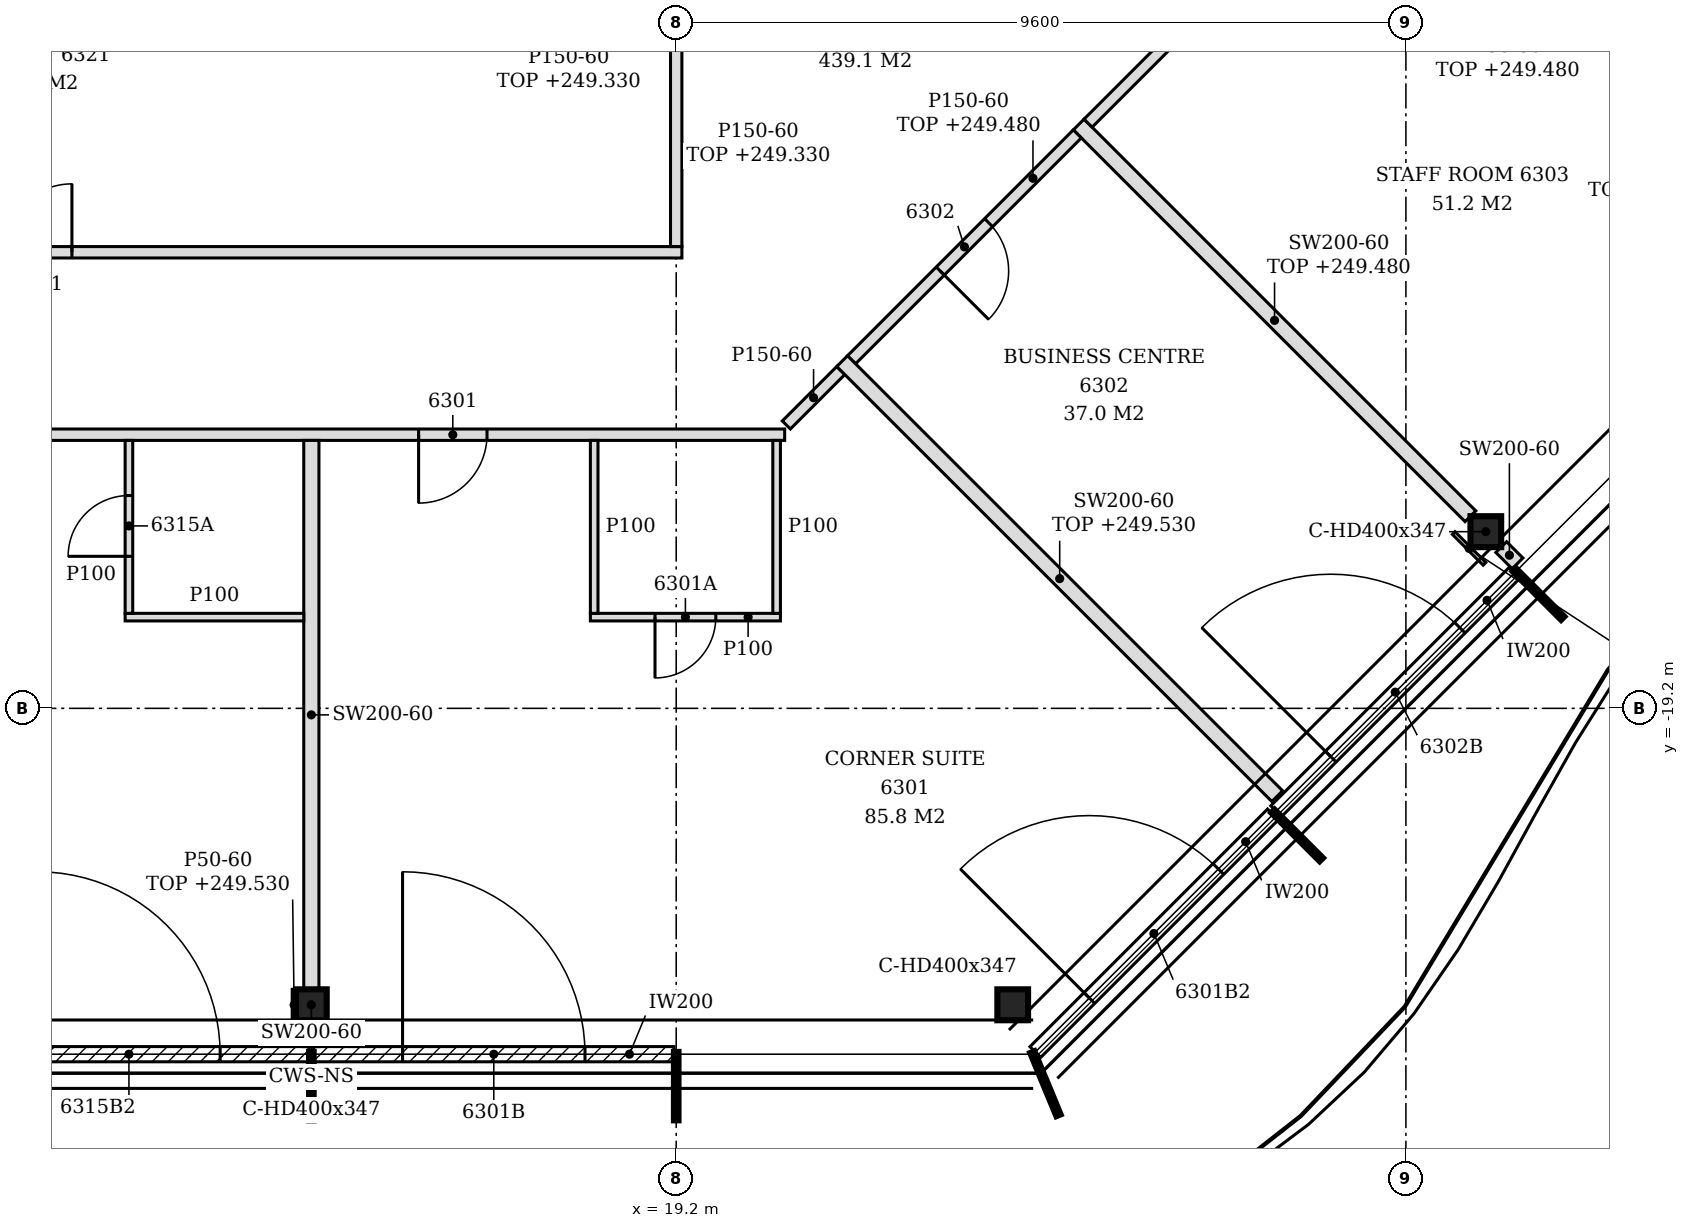
"""IFC4 building model, lengths in metres.
Left out: names, types, materials, properties, quantities, classifications, styles, units other than length and angle.
Written with IfcOpenShell. Run it as: python <this file> out.ifc"""

import sys

from ifc_helpers import new_model, si_unit, direction, frame, frame_2d, origin, origin_2d, place, context, subcontext, project, spatial, polyline, rectangle, i_section, outline, extrude, element, fill, save


model = new_model("IFC4")
c1 = context("Model", 3, precision=1e-05, world=origin(), true_north=direction((0.0, 1.0)))
c2 = subcontext(c1, "Body", "Model", "MODEL_VIEW")
j1 = project(units=[si_unit("LENGTHUNIT", "METRE"), si_unit("PLANEANGLEUNIT", "RADIAN")], contexts=[c1])
p1 = place(None, origin())
s1 = spatial("IfcSite", under=j1, at=p1, CompositionType="ELEMENT")
p2 = place(p1, origin())
s2 = spatial("IfcBuilding", under=s1, at=p2, CompositionType="ELEMENT")
p3 = place(p2, frame((0.0, 0.0, 246.6)))
s3 = spatial("IfcBuildingStorey", under=s2, at=p3, CompositionType="ELEMENT", Elevation=246.6)
for number, where, z_axis, x_axis in (
    (1, (14.4, -23.1, -0.15), (0.0, 0.0, 1.0), (1.0, 0.0, 0.0)),
    (2, (23.627, -23.1, -0.15), (0.0, 0.0, 1.0), (1.0, 0.0, 0.0)),
    (3, (29.852, -16.876, -0.15), (0.0, 0.0, 1.0), (1.0, 0.0, 0.0)),
):
    element("IfcColumn", number, at=place(p3, frame(where, z_axis=z_axis, x_axis=x_axis)), inside=s3, PredefinedType="COLUMN", context=c2, shape_type="SweptSolid", body=[
        extrude(i_section(OverallWidth=0.404, OverallDepth=0.407, WebThickness=0.027, FlangeThickness=0.044, FilletRadius=0.015, at=origin_2d()), origin(), (0.0, 0.0, 1.0), 3.6),
    ])
p4 = place(p3, frame((9.63, -23.75, 0.0), z_axis=(0.0, 0.0, 1.0), x_axis=(1.0, 0.0, 0.0)))
e4 = element("IfcWall", 4, at=p4, inside=s3, PredefinedType="NOTDEFINED", context=c2, shape_type="SweptSolid", body=[
    extrude(rectangle(XDim=4.74, YDim=0.2, at=frame_2d((2.37, 0.0))), origin(), (0.0, 0.0, 1.0), 3.45),
])
p5 = place(p4, frame((1.17, 0.0, 0.0)))
e5 = element("IfcOpeningElement", 5, at=p5, cuts=e4, PredefinedType="OPENING", context=c2, shape_type="SweptSolid", body=[
    extrude(rectangle(XDim=2.4, YDim=2.4, at=frame_2d((1.2, 1.2))), frame((0.0, 0.11, 0.0), z_axis=(0.0, -1.0, 0.0), x_axis=(1.0, 0.0, 0.0)), (0.0, 0.0, 1.0), 0.22),
])
p6 = place(p3, frame((14.43, -23.75, 0.0), z_axis=(0.0, 0.0, 1.0), x_axis=(1.0, 0.0, 0.0)))
e6 = element("IfcWall", 6, at=p6, inside=s3, PredefinedType="NOTDEFINED", context=c2, shape_type="SweptSolid", body=[
    extrude(rectangle(XDim=4.74, YDim=0.2, at=frame_2d((2.37, 0.0))), origin(), (0.0, 0.0, 1.0), 3.45),
])
p7 = place(p6, frame((1.17, 0.0, 0.0)))
e7 = element("IfcOpeningElement", 7, at=p7, cuts=e6, PredefinedType="OPENING", context=c2, shape_type="SweptSolid", body=[
    extrude(rectangle(XDim=2.4, YDim=2.4, at=frame_2d((1.2, 1.2))), frame((0.0, 0.11, 0.0), z_axis=(0.0, -1.0, 0.0), x_axis=(1.0, 0.0, 0.0)), (0.0, 0.0, 1.0), 0.22),
])
p8 = place(p3, frame((23.925, -23.722, 0.0), z_axis=(0.0, 0.0, 1.0), x_axis=(0.707106781187, 0.707106781187, 0.0)))
e8 = element("IfcWall", 8, at=p8, inside=s3, PredefinedType="NOTDEFINED", context=c2, shape_type="SweptSolid", body=[
    extrude(rectangle(XDim=4.421, YDim=0.2, at=frame_2d((2.21, 0.0))), origin(), (0.0, 0.0, 1.0), 3.45),
])
p9 = place(p8, frame((1.005, 0.0, 0.0)))
e9 = element("IfcOpeningElement", 9, at=p9, cuts=e8, PredefinedType="OPENING", context=c2, shape_type="SweptSolid", body=[
    extrude(rectangle(XDim=2.4, YDim=2.4, at=frame_2d((1.2, 1.2))), frame((0.0, 0.11, 0.0), z_axis=(0.0, -1.0, 0.0), x_axis=(1.0, 0.0, 0.0)), (0.0, 0.0, 1.0), 0.22),
])
p10 = place(p3, frame((27.093, -20.553, 0.0), z_axis=(0.0, 0.0, 1.0), x_axis=(0.707079231393, 0.707134329907, 0.0)))
e10 = element("IfcWall", 10, at=p10, inside=s3, PredefinedType="NOTDEFINED", context=c2, shape_type="SweptSolid", body=[
    extrude(rectangle(XDim=4.431, YDim=0.2, at=frame_2d((2.215, 0.0))), origin(), (0.0, 0.0, 1.0), 3.45),
])
p11 = place(p10, frame((1.015, 0.0, 0.0)))
e11 = element("IfcOpeningElement", 11, at=p11, cuts=e10, PredefinedType="OPENING", context=c2, shape_type="SweptSolid", body=[
    extrude(rectangle(XDim=2.4, YDim=2.4, at=frame_2d((1.2, 1.2))), frame((0.0, 0.11, 0.0), z_axis=(0.0, -1.0, 0.0), x_axis=(1.0, 0.0, 0.0)), (0.0, 0.0, 1.0), 0.22),
])
p12 = place(p3, frame((14.4, -23.65, 0.0), z_axis=(0.0, 0.0, 1.0), x_axis=(0.0, 1.0, 0.0)))
e12 = element("IfcWall", 12, at=p12, inside=s3, PredefinedType="PARTITIONING", context=c2, shape_type="SweptSolid", body=[
    extrude(rectangle(XDim=0.346, YDim=0.2, at=frame_2d((0.173, 0.0))), origin(), (0.0, 0.0, 1.0), 3.45),
])
p13 = place(p3, frame((14.4, -22.896, 0.0), z_axis=(0.0, 0.0, 1.0), x_axis=(0.0, 1.0, 0.0)))
e13 = element("IfcWall", 13, at=p13, inside=s3, PredefinedType="PARTITIONING", context=c2, shape_type="SweptSolid", body=[
    extrude(outline(polyline([(0.0, 0.0), (7.221, 0.0), (7.221, 3.45), (3.802, 3.45), (3.8, 2.88), (3.592, 2.88), (3.59, 3.45), (0.0, 3.45), (0.0, 0.0)])), frame((0.0, 0.1, 0.0), z_axis=(0.0, -1.0, 0.0), x_axis=(1.0, 0.0, 0.0)), (0.0, 0.0, 1.0), 0.2),
])
p14 = place(p3, frame((27.107, -20.355, 0.0), z_axis=(0.0, 0.0, 1.0), x_axis=(-0.707182179369, 0.707031374964, 0.0)))
e14 = element("IfcWall", 14, at=p14, inside=s3, PredefinedType="PARTITIONING", context=c2, shape_type="SweptSolid", body=[
    extrude(rectangle(XDim=8.095, YDim=0.2, at=frame_2d((4.047, 0.0))), origin(), (0.0, 0.0, 1.0), 2.93),
])
p15 = place(p3, frame((11.95, -18.0, 0.0), z_axis=(0.0, 0.0, 1.0), x_axis=(1.0, 0.0, 0.0)))
e15 = element("IfcWall", 15, at=p15, inside=s3, PredefinedType="PARTITIONING", context=c2, shape_type="SweptSolid", body=[
    extrude(rectangle(XDim=2.35, YDim=0.1, at=frame_2d((1.175, 0.0))), origin(), (0.0, 0.0, 1.0), 3.45),
])
p16 = place(p3, frame((18.071, -18.0, 0.0), z_axis=(0.0, 0.0, 1.0), x_axis=(1.0, 0.0, 0.0)))
e16 = element("IfcWall", 16, at=p16, inside=s3, PredefinedType="PARTITIONING", context=c2, shape_type="SweptSolid", body=[
    extrude(outline(polyline([(0.0, 0.0), (2.5, 0.0), (2.5, 3.45), (1.279, 3.45), (1.277, 2.73), (0.979, 2.73), (0.977, 3.45), (0.0, 3.45), (0.0, 0.0)])), frame((0.0, 0.05, 0.0), z_axis=(0.0, -1.0, 0.0), x_axis=(1.0, 0.0, 0.0)), (0.0, 0.0, 1.0), 0.1),
])
p17 = place(p16, frame((0.85, 0.0, 0.0)))
e17 = element("IfcOpeningElement", 17, at=p17, cuts=e16, PredefinedType="OPENING", context=c2, shape_type="SweptSolid", body=[
    extrude(rectangle(XDim=0.8, YDim=2.1, at=frame_2d((0.4, 1.05))), frame((0.0, 0.06, 0.0), z_axis=(0.0, -1.0, 0.0), x_axis=(1.0, 0.0, 0.0)), (0.0, 0.0, 1.0), 0.12),
])
p18 = place(p3, frame((12.0, -17.95, 0.0), z_axis=(0.0, 0.0, 1.0), x_axis=(0.0, 1.0, 0.0)))
e18 = element("IfcWall", 18, at=p18, inside=s3, PredefinedType="PARTITIONING", context=c2, shape_type="SweptSolid", body=[
    extrude(rectangle(XDim=2.275, YDim=0.1, at=frame_2d((1.137, 0.0))), origin(), (0.0, 0.0, 1.0), 3.45),
])
p19 = place(p18, frame((0.75, 0.0, 0.0)))
e19 = element("IfcOpeningElement", 19, at=p19, cuts=e18, PredefinedType="OPENING", context=c2, shape_type="SweptSolid", body=[
    extrude(rectangle(XDim=0.8, YDim=2.1, at=frame_2d((0.4, 1.05))), frame((0.0, 0.06, 0.0), z_axis=(0.0, -1.0, 0.0), x_axis=(1.0, 0.0, 0.0)), (0.0, 0.0, 1.0), 0.12),
])
for number, where, z_axis, x_axis in (
    (20, (18.121, -17.95, 0.0), (0.0, 0.0, 1.0), (0.0, 1.0, 0.0)),
    (21, (20.521, -17.95, 0.0), (0.0, 0.0, 1.0), (0.0, 1.0, 0.0)),
):
    element("IfcWall", number, at=place(p3, frame(where, z_axis=z_axis, x_axis=x_axis)), inside=s3, PredefinedType="PARTITIONING", context=c2, shape_type="SweptSolid", body=[
        extrude(rectangle(XDim=2.275, YDim=0.1, at=frame_2d((1.137, 0.0))), origin(), (0.0, 0.0, 1.0), 3.45),
    ])
p20 = place(p3, frame((30.269, -17.293, 0.0), z_axis=(0.0, 0.0, 1.0), x_axis=(-0.707509117806, 0.706704215511, 0.0)))
e22 = element("IfcWall", 22, at=p20, inside=s3, PredefinedType="PARTITIONING", context=c2, shape_type="SweptSolid", body=[
    extrude(rectangle(XDim=0.303, YDim=0.2, at=frame_2d((0.152, 0.0))), origin(), (0.0, 0.0, 1.0), 3.45),
])
p21 = place(p3, frame((29.649, -16.673, 0.0), z_axis=(0.0, 0.0, 1.0), x_axis=(-0.707106781187, 0.707106781187, 0.0)))
e23 = element("IfcWall", 23, at=p21, inside=s3, PredefinedType="PARTITIONING", context=c2, shape_type="SweptSolid", body=[
    extrude(rectangle(XDim=7.289, YDim=0.2, at=frame_2d((3.644, 0.0))), origin(), (0.0, 0.0, 1.0), 2.88),
])
p22 = place(p3, frame((-3.126, -15.6, 0.0), z_axis=(0.0, 0.0, 1.0), x_axis=(1.0, 0.0, 0.0)))
e24 = element("IfcWall", 24, at=p22, inside=s3, PredefinedType="PARTITIONING", context=c2, shape_type="SweptSolid", body=[
    extrude(outline(polyline([(0.0, 0.0), (23.753, 0.0), (23.753, 3.45), (22.476, 3.45), (22.474, 2.73), (22.176, 2.73), (22.174, 3.45), (10.476, 3.45), (10.474, 2.73), (10.176, 2.73), (10.174, 3.45), (1.369, 3.45), (1.367, 2.63), (0.229, 2.63), (0.227, 3.45), (0.0, 3.45), (0.0, 0.0)])), frame((0.0, 0.075, 0.0), z_axis=(0.0, -1.0, 0.0), x_axis=(1.0, 0.0, 0.0)), (0.0, 0.0, 1.0), 0.15),
])
p23 = place(p22, frame((18.937, 0.0, 0.0)))
e25 = element("IfcOpeningElement", 25, at=p23, cuts=e24, PredefinedType="OPENING", context=c2, shape_type="SweptSolid", body=[
    extrude(rectangle(XDim=0.9, YDim=2.1, at=frame_2d((0.45, 1.05))), frame((0.0, 0.085, 0.0), z_axis=(0.0, -1.0, 0.0), x_axis=(1.0, 0.0, 0.0)), (0.0, 0.0, 1.0), 0.17),
])
p24 = place(p22, frame((6.876, 0.0, 0.0)))
e26 = element("IfcOpeningElement", 26, at=p24, cuts=e24, PredefinedType="OPENING", context=c2, shape_type="SweptSolid", body=[
    extrude(rectangle(XDim=0.9, YDim=2.1, at=frame_2d((0.45, 1.05))), frame((0.0, 0.085, 0.0), z_axis=(0.0, -1.0, 0.0), x_axis=(1.0, 0.0, 0.0)), (0.0, 0.0, 1.0), 0.17),
])
p25 = place(p3, frame((20.649, -15.472, 0.0), z_axis=(0.0, 0.0, 1.0), x_axis=(0.707106781187, 0.707106781187, 0.0)))
e27 = element("IfcWall", 27, at=p25, inside=s3, PredefinedType="PARTITIONING", context=c2, shape_type="SweptSolid", body=[
    extrude(rectangle(XDim=1.013, YDim=0.15, at=frame_2d((0.506, 0.0))), origin(), (0.0, 0.0, 1.0), 3.45),
])
p26 = place(p3, frame((21.507, -14.614, 0.0), z_axis=(0.0, 0.0, 1.0), x_axis=(0.706990566745, 0.707222976531, 0.0)))
e28 = element("IfcWall", 28, at=p26, inside=s3, PredefinedType="PARTITIONING", context=c2, shape_type="SweptSolid", body=[
    extrude(rectangle(XDim=4.202, YDim=0.15, at=frame_2d((2.101, 0.0))), origin(), (0.0, 0.0, 1.0), 2.88),
])
p27 = place(p26, frame((1.651, 0.0, 0.0)))
e29 = element("IfcOpeningElement", 29, at=p27, cuts=e28, PredefinedType="OPENING", context=c2, shape_type="SweptSolid", body=[
    extrude(rectangle(XDim=0.9, YDim=2.1, at=frame_2d((0.45, 1.05))), frame((0.0, 0.085, 0.0), z_axis=(0.0, -1.0, 0.0), x_axis=(1.0, 0.0, 0.0)), (0.0, 0.0, 1.0), 0.17),
])
p28 = place(p3, frame((2.325, -13.2, 0.0), z_axis=(0.0, 0.0, 1.0), x_axis=(1.0, 0.0, 0.0)))
e30 = element("IfcWall", 30, at=p28, inside=s3, PredefinedType="PARTITIONING", context=c2, shape_type="SweptSolid", body=[
    extrude(outline(polyline([(0.0, 0.0), (16.95, 0.0), (16.95, 2.73), (16.725, 2.73), (16.723, 3.45), (5.025, 3.45), (5.023, 2.73), (4.725, 2.73), (4.723, 3.45), (0.0, 3.45), (0.0, 0.0)])), frame((0.0, 0.075, 0.0), z_axis=(0.0, -1.0, 0.0), x_axis=(1.0, 0.0, 0.0)), (0.0, 0.0, 1.0), 0.15),
])
p29 = place(p28, frame((8.025, 0.0, 0.0)))
e31 = element("IfcOpeningElement", 31, at=p29, cuts=e30, PredefinedType="OPENING", context=c2, shape_type="SweptSolid", body=[
    extrude(rectangle(XDim=0.9, YDim=2.1, at=frame_2d((0.45, 1.05))), frame((0.0, 0.085, 0.0), z_axis=(0.0, -1.0, 0.0), x_axis=(1.0, 0.0, 0.0)), (0.0, 0.0, 1.0), 0.17),
])
p30 = place(p3, frame((19.2, -13.125, 0.0), z_axis=(0.0, 0.0, 1.0), x_axis=(0.0, 1.0, 0.0)))
e32 = element("IfcWall", 32, at=p30, inside=s3, PredefinedType="PARTITIONING", context=c2, shape_type="SweptSolid", body=[
    extrude(rectangle(XDim=2.71, YDim=0.15, at=frame_2d((1.355, 0.0))), origin(), (0.0, 0.0, 1.0), 2.73),
])
p31 = place(p3, frame((34.581, -12.981, 0.0), z_axis=(0.0, 0.0, 1.0), x_axis=(-0.707133900936, 0.707079660397, 0.0)))
e33 = element("IfcWall", 33, at=p31, inside=s3, PredefinedType="PARTITIONING", context=c2, shape_type="SweptSolid", body=[
    extrude(rectangle(XDim=4.501, YDim=0.2, at=frame_2d((2.25, 0.0))), origin(), (0.0, 0.0, 1.0), 2.63),
])
p32 = place(p3, frame((24.619, -11.501, 0.0), z_axis=(0.0, 0.0, 1.0), x_axis=(0.707106781187, 0.707106781187, 0.0)))
e34 = element("IfcWall", 34, at=p32, inside=s3, PredefinedType="PARTITIONING", context=c2, shape_type="SweptSolid", body=[
    extrude(rectangle(XDim=8.702, YDim=0.15, at=frame_2d((4.351, 0.0))), origin(), (0.0, 0.0, 1.0), 2.88),
])
p33 = place(p32, frame((2.499, 0.0, 0.0)))
e35 = element("IfcOpeningElement", 35, at=p33, cuts=e34, PredefinedType="OPENING", context=c2, shape_type="SweptSolid", body=[
    extrude(rectangle(XDim=0.9, YDim=2.1, at=frame_2d((0.45, 1.05))), frame((0.0, 0.085, 0.0), z_axis=(0.0, -1.0, 0.0), x_axis=(1.0, 0.0, 0.0)), (0.0, 0.0, 1.0), 0.17),
])
p34 = place(p32, frame((6.9, 0.0, 0.0)))
e36 = element("IfcOpeningElement", 36, at=p34, cuts=e34, PredefinedType="OPENING", context=c2, shape_type="SweptSolid", body=[
    extrude(rectangle(XDim=0.9, YDim=2.1, at=frame_2d((0.45, 1.05))), frame((0.0, 0.085, 0.0), z_axis=(0.0, -1.0, 0.0), x_axis=(1.0, 0.0, 0.0)), (0.0, 0.0, 1.0), 0.17),
])
p35 = place(p3, frame((14.173, -23.303, 0.0), z_axis=(0.0, 0.0, 1.0), x_axis=(0.0, 1.0, 0.0)))
e37 = element("IfcWall", 37, at=p35, inside=s3, PredefinedType="PARTITIONING", context=c2, shape_type="SweptSolid", body=[
    extrude(rectangle(XDim=0.407, YDim=0.05, at=frame_2d((0.204, 0.0))), origin(), (0.0, 0.0, 1.0), 2.93),
])
p36 = place(p3, frame((29.834, -17.299, 0.0), z_axis=(0.0, 0.0, 1.0), x_axis=(-0.707106781187, 0.707106781187, 0.0)))
e38 = element("IfcWall", 38, at=p36, inside=s3, PredefinedType="PARTITIONING", context=c2, shape_type="SweptSolid", body=[
    extrude(rectangle(XDim=0.573, YDim=0.05, at=frame_2d((0.287, 0.0))), origin(), (0.0, 0.0, 1.0), 2.93),
])
p37 = place(p5, origin())
e39 = element("IfcDoor", 39, at=p37, inside=s3, OperationType="SINGLE_SWING_LEFT", PredefinedType="DOOR", context=c2, shape_type="SweptSolid", body=[
    extrude(rectangle(XDim=2.4, YDim=2.4, at=frame_2d((1.2, 1.2))), frame((0.0, 0.025, 0.0), z_axis=(0.0, -1.0, 0.0), x_axis=(1.0, 0.0, 0.0)), (0.0, 0.0, 1.0), 0.05),
])
fill(e5, e39)
p38 = place(p7, origin())
e40 = element("IfcDoor", 40, at=p38, inside=s3, OperationType="SINGLE_SWING_LEFT", PredefinedType="DOOR", context=c2, shape_type="SweptSolid", body=[
    extrude(rectangle(XDim=2.4, YDim=2.4, at=frame_2d((1.2, 1.2))), frame((0.0, 0.025, 0.0), z_axis=(0.0, -1.0, 0.0), x_axis=(1.0, 0.0, 0.0)), (0.0, 0.0, 1.0), 0.05),
])
fill(e7, e40)
p39 = place(p9, origin())
e41 = element("IfcDoor", 41, at=p39, inside=s3, OperationType="SINGLE_SWING_LEFT", PredefinedType="DOOR", context=c2, shape_type="SweptSolid", body=[
    extrude(rectangle(XDim=2.4, YDim=2.4, at=frame_2d((1.2, 1.2))), frame((0.0, 0.025, 0.0), z_axis=(0.0, -1.0, 0.0), x_axis=(1.0, 0.0, 0.0)), (0.0, 0.0, 1.0), 0.05),
])
fill(e9, e41)
p40 = place(p11, origin())
e42 = element("IfcDoor", 42, at=p40, inside=s3, OperationType="SINGLE_SWING_LEFT", PredefinedType="DOOR", context=c2, shape_type="SweptSolid", body=[
    extrude(rectangle(XDim=2.4, YDim=2.4, at=frame_2d((1.2, 1.2))), frame((0.0, 0.025, 0.0), z_axis=(0.0, -1.0, 0.0), x_axis=(1.0, 0.0, 0.0)), (0.0, 0.0, 1.0), 0.05),
])
fill(e11, e42)
p41 = place(p23, frame((0.9, 0.0, 0.0), z_axis=(0.0, 0.0, 1.0), x_axis=(-1.0, 0.0, 0.0)))
e43 = element("IfcDoor", 43, at=p41, inside=s3, OperationType="SINGLE_SWING_RIGHT", PredefinedType="DOOR", context=c2, shape_type="SweptSolid", body=[
    extrude(rectangle(XDim=0.9, YDim=2.1, at=frame_2d((0.45, 1.05))), frame((0.0, 0.025, 0.0), z_axis=(0.0, -1.0, 0.0), x_axis=(1.0, 0.0, 0.0)), (0.0, 0.0, 1.0), 0.05),
])
fill(e25, e43)
p42 = place(p17, frame((0.8, 0.0, 0.0), z_axis=(0.0, 0.0, 1.0), x_axis=(-1.0, 0.0, 0.0)))
e44 = element("IfcDoor", 44, at=p42, inside=s3, OperationType="SINGLE_SWING_RIGHT", PredefinedType="DOOR", context=c2, shape_type="SweptSolid", body=[
    extrude(rectangle(XDim=0.8, YDim=2.1, at=frame_2d((0.4, 1.05))), frame((0.0, 0.025, 0.0), z_axis=(0.0, -1.0, 0.0), x_axis=(1.0, 0.0, 0.0)), (0.0, 0.0, 1.0), 0.05),
])
fill(e17, e44)
p43 = place(p27, frame((0.9, 0.0, 0.0), z_axis=(0.0, 0.0, 1.0), x_axis=(-1.0, 0.0, 0.0)))
e45 = element("IfcDoor", 45, at=p43, inside=s3, OperationType="SINGLE_SWING_RIGHT", PredefinedType="DOOR", context=c2, shape_type="SweptSolid", body=[
    extrude(rectangle(XDim=0.9, YDim=2.1, at=frame_2d((0.45, 1.05))), frame((0.0, 0.025, 0.0), z_axis=(0.0, -1.0, 0.0), x_axis=(1.0, 0.0, 0.0)), (0.0, 0.0, 1.0), 0.05),
])
fill(e29, e45)
p44 = place(p19, origin())
e46 = element("IfcDoor", 46, at=p44, inside=s3, OperationType="SINGLE_SWING_LEFT", PredefinedType="DOOR", context=c2, shape_type="SweptSolid", body=[
    extrude(rectangle(XDim=0.8, YDim=2.1, at=frame_2d((0.4, 1.05))), frame((0.0, 0.025, 0.0), z_axis=(0.0, -1.0, 0.0), x_axis=(1.0, 0.0, 0.0)), (0.0, 0.0, 1.0), 0.05),
])
fill(e19, e46)
p45 = place(p29, origin())
e47 = element("IfcDoor", 47, at=p45, inside=s3, OperationType="SINGLE_SWING_RIGHT", PredefinedType="DOOR", context=c2, shape_type="SweptSolid", body=[
    extrude(rectangle(XDim=0.9, YDim=2.1, at=frame_2d((0.45, 1.05))), frame((0.0, 0.025, 0.0), z_axis=(0.0, -1.0, 0.0), x_axis=(1.0, 0.0, 0.0)), (0.0, 0.0, 1.0), 0.05),
])
fill(e31, e47)
save(model, sys.argv[1])
